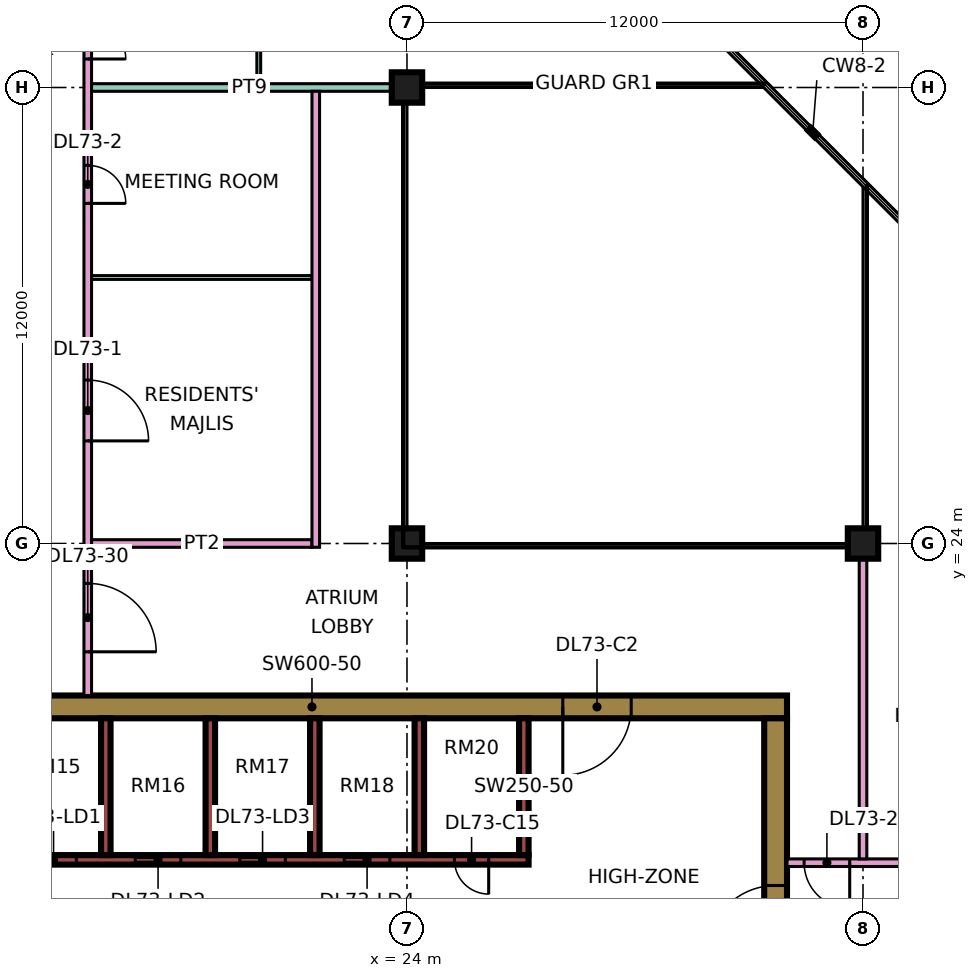
"""IFC4 building model, lengths in metres.
Left out: names, types, materials, properties, quantities, classifications, styles, units other than length and angle.
Written with IfcOpenShell. Run it as: python <this file> out.ifc"""

import sys

from ifc_helpers import new_model, si_unit, direction, frame, frame_2d, origin, origin_2d, place, context, subcontext, project, spatial, rectangle, extrude, element, fill, save


model = new_model("IFC4")
c1 = context("Model", 3, precision=1e-05, world=origin(), true_north=direction((0.0, 1.0)))
c2 = subcontext(c1, "Body", "Model", "MODEL_VIEW")
j1 = project(units=[si_unit("LENGTHUNIT", "METRE"), si_unit("PLANEANGLEUNIT", "RADIAN")], contexts=[c1])
p1 = place(None, origin())
s1 = spatial("IfcSite", under=j1, at=p1, CompositionType="ELEMENT")
p2 = place(p1, origin())
s2 = spatial("IfcBuilding", under=s1, at=p2, CompositionType="ELEMENT")
p3 = place(p2, frame((0.0, 0.0, 310.9)))
s3 = spatial("IfcBuildingStorey", under=s2, at=p3, CompositionType="ELEMENT", Elevation=310.9)
for number, where, z_axis, x_axis in (
    (1, (24.0, 24.0, 0.0), (0.0, 0.0, 1.0), (1.0, 0.0, 0.0)),
    (2, (24.0, 36.0, 0.0), (0.0, 0.0, 1.0), (1.0, 0.0, 0.0)),
    (3, (36.0, 24.0, 0.0), (0.0, 0.0, 1.0), (1.0, 0.0, 0.0)),
):
    element("IfcColumn", number, at=place(p3, frame(where, z_axis=z_axis, x_axis=x_axis)), inside=s3, PredefinedType="COLUMN", context=c2, shape_type="SweptSolid", body=[
        extrude(rectangle(XDim=0.8, YDim=0.8, at=origin_2d()), origin(), (0.0, 0.0, 1.0), 3.75),
    ])
p4 = place(p3, frame((9.0, 19.7, 0.0), z_axis=(0.0, 0.0, 1.0), x_axis=(1.0, 0.0, 0.0)))
e4 = element("IfcWall", 4, at=p4, inside=s3, PredefinedType="SHEAR", context=c2, shape_type="SweptSolid", body=[
    extrude(rectangle(XDim=25.0, YDim=0.6, at=frame_2d((12.5, 0.0))), origin(), (0.0, 0.0, 1.0), 3.75),
])
p5 = place(p4, frame((19.1, 0.0, 0.0)))
e5 = element("IfcOpeningElement", 5, at=p5, cuts=e4, PredefinedType="OPENING", context=c2, shape_type="SweptSolid", body=[
    extrude(rectangle(XDim=1.8, YDim=2.4, at=frame_2d((0.9, 1.2))), frame((0.0, 0.31, 0.0), z_axis=(0.0, -1.0, 0.0), x_axis=(1.0, 0.0, 0.0)), (0.0, 0.0, 1.0), 0.62),
])
p6 = place(p3, frame((33.7, 7.6, 0.0), z_axis=(0.0, 0.0, 1.0), x_axis=(0.0, 1.0, 0.0)))
e6 = element("IfcWall", 6, at=p6, inside=s3, PredefinedType="SHEAR", context=c2, shape_type="SweptSolid", body=[
    extrude(rectangle(XDim=11.8, YDim=0.6, at=frame_2d((5.9, 0.0))), origin(), (0.0, 0.0, 1.0), 3.75),
])
p7 = place(p6, frame((5.6, 0.0, 0.0)))
e7 = element("IfcOpeningElement", 7, at=p7, cuts=e6, PredefinedType="OPENING", context=c2, shape_type="SweptSolid", body=[
    extrude(rectangle(XDim=1.8, YDim=2.4, at=frame_2d((0.9, 1.2))), frame((0.0, 0.31, 0.0), z_axis=(0.0, -1.0, 0.0), x_axis=(1.0, 0.0, 0.0)), (0.0, 0.0, 1.0), 0.62),
])
p8 = place(p3, frame((13.45, 15.675, 0.0), z_axis=(0.0, 0.0, 1.0), x_axis=(1.0, 0.0, 0.0)))
e8 = element("IfcWall", 8, at=p8, inside=s3, PredefinedType="SHEAR", context=c2, shape_type="SweptSolid", body=[
    extrude(rectangle(XDim=13.75, YDim=0.25, at=frame_2d((6.875, 0.0))), origin(), (0.0, 0.0, 1.0), 3.75),
])
p9 = place(p8, frame((0.65, 0.0, 0.0)))
e9 = element("IfcOpeningElement", 9, at=p9, cuts=e8, PredefinedType="OPENING", context=c2, shape_type="SweptSolid", body=[
    extrude(rectangle(XDim=1.2, YDim=2.2, at=frame_2d((0.6, 1.1))), frame((0.0, 0.135, 0.0), z_axis=(0.0, -1.0, 0.0), x_axis=(1.0, 0.0, 0.0)), (0.0, 0.0, 1.0), 0.27),
])
p10 = place(p8, frame((3.4, 0.0, 0.0)))
e10 = element("IfcOpeningElement", 10, at=p10, cuts=e8, PredefinedType="OPENING", context=c2, shape_type="SweptSolid", body=[
    extrude(rectangle(XDim=1.2, YDim=2.2, at=frame_2d((0.6, 1.1))), frame((0.0, 0.135, 0.0), z_axis=(0.0, -1.0, 0.0), x_axis=(1.0, 0.0, 0.0)), (0.0, 0.0, 1.0), 0.27),
])
p11 = place(p8, frame((6.15, 0.0, 0.0)))
e11 = element("IfcOpeningElement", 11, at=p11, cuts=e8, PredefinedType="OPENING", context=c2, shape_type="SweptSolid", body=[
    extrude(rectangle(XDim=1.2, YDim=2.2, at=frame_2d((0.6, 1.1))), frame((0.0, 0.135, 0.0), z_axis=(0.0, -1.0, 0.0), x_axis=(1.0, 0.0, 0.0)), (0.0, 0.0, 1.0), 0.27),
])
p12 = place(p8, frame((8.9, 0.0, 0.0)))
e12 = element("IfcOpeningElement", 12, at=p12, cuts=e8, PredefinedType="OPENING", context=c2, shape_type="SweptSolid", body=[
    extrude(rectangle(XDim=1.2, YDim=2.2, at=frame_2d((0.6, 1.1))), frame((0.0, 0.135, 0.0), z_axis=(0.0, -1.0, 0.0), x_axis=(1.0, 0.0, 0.0)), (0.0, 0.0, 1.0), 0.27),
])
p13 = place(p8, frame((11.8, 0.0, 0.0)))
e13 = element("IfcOpeningElement", 13, at=p13, cuts=e8, PredefinedType="OPENING", context=c2, shape_type="SweptSolid", body=[
    extrude(rectangle(XDim=0.9, YDim=2.1, at=frame_2d((0.45, 1.05))), frame((0.0, 0.135, 0.0), z_axis=(0.0, -1.0, 0.0), x_axis=(1.0, 0.0, 0.0)), (0.0, 0.0, 1.0), 0.27),
])
for number, where, z_axis, x_axis in (
    (14, (16.075, 15.8, 0.0), (0.0, 0.0, 1.0), (0.0, 1.0, 0.0)),
    (15, (18.825, 15.8, 0.0), (0.0, 0.0, 1.0), (0.0, 1.0, 0.0)),
    (16, (21.575, 15.8, 0.0), (0.0, 0.0, 1.0), (0.0, 1.0, 0.0)),
    (17, (24.325, 15.8, 0.0), (0.0, 0.0, 1.0), (0.0, 1.0, 0.0)),
    (18, (27.075, 15.8, 0.0), (0.0, 0.0, 1.0), (0.0, 1.0, 0.0)),
):
    element("IfcWall", number, at=place(p3, frame(where, z_axis=z_axis, x_axis=x_axis)), inside=s3, PredefinedType="SHEAR", context=c2, shape_type="SweptSolid", body=[
        extrude(rectangle(XDim=3.6, YDim=0.25, at=frame_2d((1.8, 0.0))), origin(), (0.0, 0.0, 1.0), 3.75),
    ])
p14 = place(p3, frame((15.6, 20.0, 0.0), z_axis=(0.0, 0.0, 1.0), x_axis=(0.0, 1.0, 0.0)))
e19 = element("IfcWall", 19, at=p14, inside=s3, PredefinedType="PARTITIONING", context=c2, shape_type="SweptSolid", body=[
    extrude(rectangle(XDim=27.775, YDim=0.2, at=frame_2d((13.887, 0.0))), origin(), (0.0, 0.0, 1.0), 3.35),
])
p15 = place(p14, frame((6.7, 0.0, 0.0)))
e20 = element("IfcOpeningElement", 20, at=p15, cuts=e19, PredefinedType="OPENING", context=c2, shape_type="SweptSolid", body=[
    extrude(rectangle(XDim=1.6, YDim=2.1, at=frame_2d((0.8, 1.05))), frame((0.0, 0.11, 0.0), z_axis=(0.0, -1.0, 0.0), x_axis=(1.0, 0.0, 0.0)), (0.0, 0.0, 1.0), 0.22),
])
p16 = place(p14, frame((12.95, 0.0, 0.0)))
e21 = element("IfcOpeningElement", 21, at=p16, cuts=e19, PredefinedType="OPENING", context=c2, shape_type="SweptSolid", body=[
    extrude(rectangle(XDim=1.0, YDim=2.1, at=frame_2d((0.5, 1.05))), frame((0.0, 0.11, 0.0), z_axis=(0.0, -1.0, 0.0), x_axis=(1.0, 0.0, 0.0)), (0.0, 0.0, 1.0), 0.22),
])
p17 = place(p14, frame((16.75, 0.0, 0.0)))
e22 = element("IfcOpeningElement", 22, at=p17, cuts=e19, PredefinedType="OPENING", context=c2, shape_type="SweptSolid", body=[
    extrude(rectangle(XDim=1.0, YDim=2.1, at=frame_2d((0.5, 1.05))), frame((0.0, 0.11, 0.0), z_axis=(0.0, -1.0, 0.0), x_axis=(1.0, 0.0, 0.0)), (0.0, 0.0, 1.0), 0.22),
])
p18 = place(p14, frame((1.15, 0.0, 0.0)))
e23 = element("IfcOpeningElement", 23, at=p18, cuts=e19, PredefinedType="OPENING", context=c2, shape_type="SweptSolid", body=[
    extrude(rectangle(XDim=1.8, YDim=2.1, at=frame_2d((0.9, 1.05))), frame((0.0, 0.11, 0.0), z_axis=(0.0, -1.0, 0.0), x_axis=(1.0, 0.0, 0.0)), (0.0, 0.0, 1.0), 0.22),
])
p19 = place(p14, frame((25.9, 0.0, 0.0)))
e24 = element("IfcOpeningElement", 24, at=p19, cuts=e19, PredefinedType="OPENING", context=c2, shape_type="SweptSolid", body=[
    extrude(rectangle(XDim=1.0, YDim=2.1, at=frame_2d((0.5, 1.05))), frame((0.0, 0.11, 0.0), z_axis=(0.0, -1.0, 0.0), x_axis=(1.0, 0.0, 0.0)), (0.0, 0.0, 1.0), 0.22),
])
p20 = place(p3, frame((15.7, 24.0, 0.0), z_axis=(0.0, 0.0, 1.0), x_axis=(1.0, 0.0, 0.0)))
e25 = element("IfcWall", 25, at=p20, inside=s3, PredefinedType="PARTITIONING", context=c2, shape_type="SweptSolid", body=[
    extrude(rectangle(XDim=5.8, YDim=0.2, at=frame_2d((2.9, 0.0))), origin(), (0.0, 0.0, 1.0), 3.35),
])
p21 = place(p3, frame((15.7, 31.0, 0.0), z_axis=(0.0, 0.0, 1.0), x_axis=(1.0, 0.0, 0.0)))
e26 = element("IfcWall", 26, at=p21, inside=s3, PredefinedType="PARTITIONING", context=c2, shape_type="SweptSolid", body=[
    extrude(rectangle(XDim=5.8, YDim=0.1, at=frame_2d((2.9, 0.0))), origin(), (0.0, 0.0, 1.0), 3.35),
])
p22 = place(p3, frame((15.7, 36.0, 0.0), z_axis=(0.0, 0.0, 1.0), x_axis=(1.0, 0.0, 0.0)))
e27 = element("IfcWall", 27, at=p22, inside=s3, PredefinedType="PARTITIONING", context=c2, shape_type="SweptSolid", body=[
    extrude(rectangle(XDim=8.3, YDim=0.2, at=frame_2d((4.15, 0.0))), origin(), (0.0, 0.0, 1.0), 3.35),
])
p23 = place(p3, frame((20.1, 36.1, 0.0), z_axis=(0.0, 0.0, 1.0), x_axis=(0.0, 1.0, 0.0)))
e28 = element("IfcWall", 28, at=p23, inside=s3, PredefinedType="PARTITIONING", context=c2, shape_type="SweptSolid", body=[
    extrude(rectangle(XDim=5.95, YDim=0.1, at=frame_2d((2.975, 0.0))), origin(), (0.0, 0.0, 1.0), 3.35),
])
p24 = place(p23, frame((0.95, 0.0, 0.0)))
e29 = element("IfcOpeningElement", 29, at=p24, cuts=e28, PredefinedType="OPENING", context=c2, shape_type="SweptSolid", body=[
    extrude(rectangle(XDim=0.9, YDim=2.1, at=frame_2d((0.45, 1.05))), frame((0.0, 0.06, 0.0), z_axis=(0.0, -1.0, 0.0), x_axis=(1.0, 0.0, 0.0)), (0.0, 0.0, 1.0), 0.12),
])
p25 = place(p23, frame((3.95, 0.0, 0.0)))
e30 = element("IfcOpeningElement", 30, at=p25, cuts=e28, PredefinedType="OPENING", context=c2, shape_type="SweptSolid", body=[
    extrude(rectangle(XDim=0.9, YDim=2.1, at=frame_2d((0.45, 1.05))), frame((0.0, 0.06, 0.0), z_axis=(0.0, -1.0, 0.0), x_axis=(1.0, 0.0, 0.0)), (0.0, 0.0, 1.0), 0.12),
])
p26 = place(p3, frame((21.6, 23.9, 0.0), z_axis=(0.0, 0.0, 1.0), x_axis=(0.0, 1.0, 0.0)))
e31 = element("IfcWall", 31, at=p26, inside=s3, PredefinedType="PARTITIONING", context=c2, shape_type="SweptSolid", body=[
    extrude(rectangle(XDim=12.0, YDim=0.2, at=frame_2d((6.0, 0.0))), origin(), (0.0, 0.0, 1.0), 3.35),
])
p27 = place(p3, frame((34.0, 15.6, 0.0), z_axis=(0.0, 0.0, 1.0), x_axis=(1.0, 0.0, 0.0)))
e32 = element("IfcWall", 32, at=p27, inside=s3, PredefinedType="PARTITIONING", context=c2, shape_type="SweptSolid", body=[
    extrude(rectangle(XDim=10.35, YDim=0.2, at=frame_2d((5.175, 0.0))), origin(), (0.0, 0.0, 1.0), 3.35),
])
p28 = place(p27, frame((5.6, 0.0, 0.0)))
e33 = element("IfcOpeningElement", 33, at=p28, cuts=e32, PredefinedType="OPENING", context=c2, shape_type="SweptSolid", body=[
    extrude(rectangle(XDim=1.0, YDim=2.1, at=frame_2d((0.5, 1.05))), frame((0.0, 0.11, 0.0), z_axis=(0.0, -1.0, 0.0), x_axis=(1.0, 0.0, 0.0)), (0.0, 0.0, 1.0), 0.22),
])
p29 = place(p27, frame((0.45, 0.0, 0.0)))
e34 = element("IfcOpeningElement", 34, at=p29, cuts=e32, PredefinedType="OPENING", context=c2, shape_type="SweptSolid", body=[
    extrude(rectangle(XDim=1.2, YDim=2.1, at=frame_2d((0.6, 1.05))), frame((0.0, 0.11, 0.0), z_axis=(0.0, -1.0, 0.0), x_axis=(1.0, 0.0, 0.0)), (0.0, 0.0, 1.0), 0.22),
])
p30 = place(p3, frame((36.0, 15.7, 0.0), z_axis=(0.0, 0.0, 1.0), x_axis=(0.0, 1.0, 0.0)))
e35 = element("IfcWall", 35, at=p30, inside=s3, PredefinedType="PARTITIONING", context=c2, shape_type="SweptSolid", body=[
    extrude(rectangle(XDim=8.3, YDim=0.2, at=frame_2d((4.15, 0.0))), origin(), (0.0, 0.0, 1.0), 3.35),
])
p31 = place(p9, origin())
e36 = element("IfcDoor", 36, at=p31, inside=s3, OperationType="DOUBLE_DOOR_SLIDING", PredefinedType="DOOR", context=c2, shape_type="SweptSolid", body=[
    extrude(rectangle(XDim=1.2, YDim=2.2, at=frame_2d((0.6, 1.1))), frame((0.0, 0.025, 0.0), z_axis=(0.0, -1.0, 0.0), x_axis=(1.0, 0.0, 0.0)), (0.0, 0.0, 1.0), 0.05),
])
fill(e9, e36)
p32 = place(p10, origin())
e37 = element("IfcDoor", 37, at=p32, inside=s3, OperationType="DOUBLE_DOOR_SLIDING", PredefinedType="DOOR", context=c2, shape_type="SweptSolid", body=[
    extrude(rectangle(XDim=1.2, YDim=2.2, at=frame_2d((0.6, 1.1))), frame((0.0, 0.025, 0.0), z_axis=(0.0, -1.0, 0.0), x_axis=(1.0, 0.0, 0.0)), (0.0, 0.0, 1.0), 0.05),
])
fill(e10, e37)
p33 = place(p11, origin())
e38 = element("IfcDoor", 38, at=p33, inside=s3, OperationType="DOUBLE_DOOR_SLIDING", PredefinedType="DOOR", context=c2, shape_type="SweptSolid", body=[
    extrude(rectangle(XDim=1.2, YDim=2.2, at=frame_2d((0.6, 1.1))), frame((0.0, 0.025, 0.0), z_axis=(0.0, -1.0, 0.0), x_axis=(1.0, 0.0, 0.0)), (0.0, 0.0, 1.0), 0.05),
])
fill(e11, e38)
p34 = place(p12, origin())
e39 = element("IfcDoor", 39, at=p34, inside=s3, OperationType="DOUBLE_DOOR_SLIDING", PredefinedType="DOOR", context=c2, shape_type="SweptSolid", body=[
    extrude(rectangle(XDim=1.2, YDim=2.2, at=frame_2d((0.6, 1.1))), frame((0.0, 0.025, 0.0), z_axis=(0.0, -1.0, 0.0), x_axis=(1.0, 0.0, 0.0)), (0.0, 0.0, 1.0), 0.05),
])
fill(e12, e39)
p35 = place(p7, origin())
e40 = element("IfcDoor", 40, at=p35, inside=s3, OperationType="DOUBLE_DOOR_SINGLE_SWING", PredefinedType="DOOR", context=c2, shape_type="SweptSolid", body=[
    extrude(rectangle(XDim=1.8, YDim=2.4, at=frame_2d((0.9, 1.2))), frame((0.0, 0.025, 0.0), z_axis=(0.0, -1.0, 0.0), x_axis=(1.0, 0.0, 0.0)), (0.0, 0.0, 1.0), 0.05),
])
fill(e7, e40)
p36 = place(p5, frame((1.8, 0.0, 0.0), z_axis=(0.0, 0.0, 1.0), x_axis=(-1.0, 0.0, 0.0)))
e41 = element("IfcDoor", 41, at=p36, inside=s3, OperationType="DOUBLE_DOOR_SINGLE_SWING", PredefinedType="DOOR", context=c2, shape_type="SweptSolid", body=[
    extrude(rectangle(XDim=1.8, YDim=2.4, at=frame_2d((0.9, 1.2))), frame((0.0, 0.025, 0.0), z_axis=(0.0, -1.0, 0.0), x_axis=(1.0, 0.0, 0.0)), (0.0, 0.0, 1.0), 0.05),
])
fill(e5, e41)
p37 = place(p13, origin())
e42 = element("IfcDoor", 42, at=p37, inside=s3, OperationType="SINGLE_SWING_RIGHT", PredefinedType="DOOR", context=c2, shape_type="SweptSolid", body=[
    extrude(rectangle(XDim=0.9, YDim=2.1, at=frame_2d((0.45, 1.05))), frame((0.0, 0.025, 0.0), z_axis=(0.0, -1.0, 0.0), x_axis=(1.0, 0.0, 0.0)), (0.0, 0.0, 1.0), 0.05),
])
fill(e13, e42)
p38 = place(p15, frame((1.6, 0.0, 0.0), z_axis=(0.0, 0.0, 1.0), x_axis=(-1.0, 0.0, 0.0)))
e43 = element("IfcDoor", 43, at=p38, inside=s3, OperationType="DOUBLE_DOOR_SINGLE_SWING", PredefinedType="DOOR", context=c2, shape_type="SweptSolid", body=[
    extrude(rectangle(XDim=1.6, YDim=2.1, at=frame_2d((0.8, 1.05))), frame((0.0, 0.025, 0.0), z_axis=(0.0, -1.0, 0.0), x_axis=(1.0, 0.0, 0.0)), (0.0, 0.0, 1.0), 0.05),
])
fill(e20, e43)
p39 = place(p16, frame((1.0, 0.0, 0.0), z_axis=(0.0, 0.0, 1.0), x_axis=(-1.0, 0.0, 0.0)))
e44 = element("IfcDoor", 44, at=p39, inside=s3, OperationType="SINGLE_SWING_LEFT", PredefinedType="DOOR", context=c2, shape_type="SweptSolid", body=[
    extrude(rectangle(XDim=1.0, YDim=2.1, at=frame_2d((0.5, 1.05))), frame((0.0, 0.025, 0.0), z_axis=(0.0, -1.0, 0.0), x_axis=(1.0, 0.0, 0.0)), (0.0, 0.0, 1.0), 0.05),
])
fill(e21, e44)
p40 = place(p17, frame((1.0, 0.0, 0.0), z_axis=(0.0, 0.0, 1.0), x_axis=(-1.0, 0.0, 0.0)))
e45 = element("IfcDoor", 45, at=p40, inside=s3, OperationType="SINGLE_SWING_LEFT", PredefinedType="DOOR", context=c2, shape_type="SweptSolid", body=[
    extrude(rectangle(XDim=1.0, YDim=2.1, at=frame_2d((0.5, 1.05))), frame((0.0, 0.025, 0.0), z_axis=(0.0, -1.0, 0.0), x_axis=(1.0, 0.0, 0.0)), (0.0, 0.0, 1.0), 0.05),
])
fill(e22, e45)
p41 = place(p29, origin())
e46 = element("IfcDoor", 46, at=p41, inside=s3, OperationType="SINGLE_SWING_RIGHT", PredefinedType="DOOR", context=c2, shape_type="SweptSolid", body=[
    extrude(rectangle(XDim=1.2, YDim=2.1, at=frame_2d((0.6, 1.05))), frame((0.0, 0.025, 0.0), z_axis=(0.0, -1.0, 0.0), x_axis=(1.0, 0.0, 0.0)), (0.0, 0.0, 1.0), 0.05),
])
fill(e34, e46)
p42 = place(p18, frame((1.8, 0.0, 0.0), z_axis=(0.0, 0.0, 1.0), x_axis=(-1.0, 0.0, 0.0)))
e47 = element("IfcDoor", 47, at=p42, inside=s3, OperationType="DOUBLE_DOOR_SINGLE_SWING", PredefinedType="DOOR", context=c2, shape_type="SweptSolid", body=[
    extrude(rectangle(XDim=1.8, YDim=2.1, at=frame_2d((0.9, 1.05))), frame((0.0, 0.025, 0.0), z_axis=(0.0, -1.0, 0.0), x_axis=(1.0, 0.0, 0.0)), (0.0, 0.0, 1.0), 0.05),
])
fill(e23, e47)
save(model, sys.argv[1])
